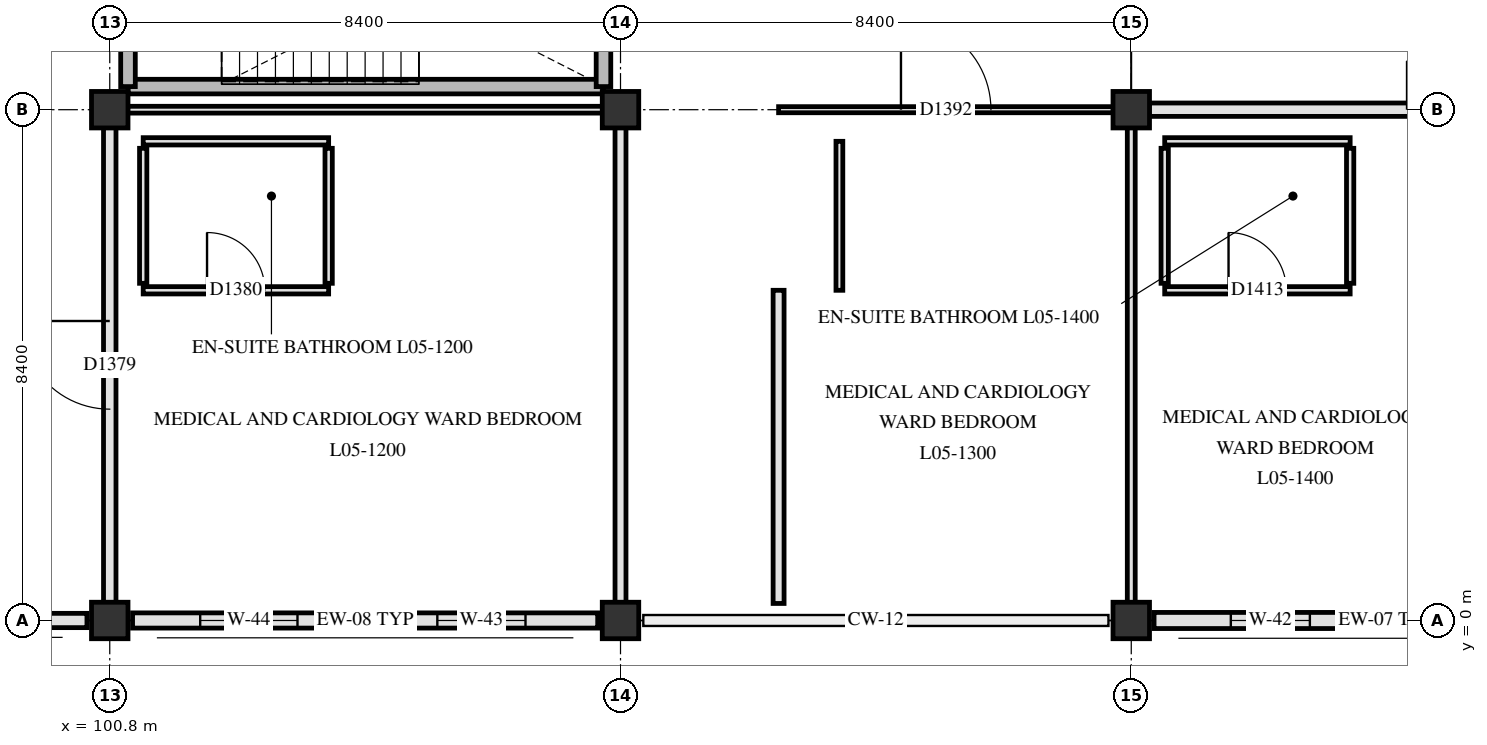
"""IFC4 building model, lengths in metres.
Left out: names, types, materials, properties, quantities, classifications, styles, units other than length and angle.
Written with IfcOpenShell. Run it as: python <this file> out.ifc"""

import sys

from ifc_helpers import new_model, si_unit, direction, frame, frame_2d, origin, origin_2d, place, context, subcontext, project, spatial, rectangle, extrude, element, fill, save


model = new_model("IFC4")
c1 = context("Model", 3, precision=1e-05, world=origin(), true_north=direction((0.0, 1.0)))
c2 = subcontext(c1, "Body", "Model", "MODEL_VIEW")
j1 = project(units=[si_unit("LENGTHUNIT", "METRE"), si_unit("PLANEANGLEUNIT", "RADIAN")], contexts=[c1])
p1 = place(None, origin())
s1 = spatial("IfcSite", under=j1, at=p1, CompositionType="ELEMENT")
p2 = place(p1, origin())
s2 = spatial("IfcBuilding", under=s1, at=p2, CompositionType="ELEMENT")
p3 = place(p2, frame((0.0, 0.0, 22.5)))
s3 = spatial("IfcBuildingStorey", under=s2, at=p3, CompositionType="ELEMENT", Elevation=22.5)
for number, where, z_axis, x_axis in (
    (1, (100.8, 0.0, 0.0), (0.0, 0.0, 1.0), (1.0, 0.0, 0.0)),
    (2, (100.8, 8.4, 0.0), (0.0, 0.0, 1.0), (1.0, 0.0, 0.0)),
    (3, (109.2, 0.0, 0.0), (0.0, 0.0, 1.0), (1.0, 0.0, 0.0)),
    (4, (109.2, 8.4, 0.0), (0.0, 0.0, 1.0), (1.0, 0.0, 0.0)),
    (5, (117.6, 0.0, 0.0), (0.0, 0.0, 1.0), (1.0, 0.0, 0.0)),
    (6, (117.6, 8.4, 0.0), (0.0, 0.0, 1.0), (1.0, 0.0, 0.0)),
):
    element("IfcColumn", number, at=place(p3, frame(where, z_axis=z_axis, x_axis=x_axis)), inside=s3, PredefinedType="COLUMN", context=c2, shape_type="SweptSolid", body=[
        extrude(rectangle(XDim=0.6, YDim=0.6, at=origin_2d()), origin(), (0.0, 0.0, 1.0), 3.9),
    ])
p4 = place(p3, frame((125.625, 0.0, 0.0), z_axis=(0.0, 0.0, 1.0), x_axis=(-1.0, 0.0, 0.0)))
e7 = element("IfcWall", 7, at=p4, inside=s3, PredefinedType="SOLIDWALL", context=c2, shape_type="SweptSolid", body=[
    extrude(rectangle(XDim=7.65, YDim=0.265, at=frame_2d((3.825, 0.0))), origin(), (0.0, 0.0, 1.0), 3.31),
])
p5 = place(p4, frame((1.337, 0.0, 0.85)))
e8 = element("IfcOpeningElement", 8, at=p5, cuts=e7, PredefinedType="OPENING", context=c2, shape_type="SweptSolid", body=[
    extrude(rectangle(XDim=1.15, YDim=1.78, at=frame_2d((0.575, 0.89))), frame((0.0, 0.142, 0.0), z_axis=(0.0, -1.0, 0.0), x_axis=(1.0, 0.0, 0.0)), (0.0, 0.0, 1.0), 0.285),
])
p6 = place(p4, frame((5.087, 0.0, 0.85)))
e9 = element("IfcOpeningElement", 9, at=p6, cuts=e7, PredefinedType="OPENING", context=c2, shape_type="SweptSolid", body=[
    extrude(rectangle(XDim=1.3, YDim=1.78, at=frame_2d((0.65, 0.89))), frame((0.0, 0.142, 0.0), z_axis=(0.0, -1.0, 0.0), x_axis=(1.0, 0.0, 0.0)), (0.0, 0.0, 1.0), 0.285),
])
p7 = place(p3, frame((108.825, 0.0, 0.0), z_axis=(0.0, 0.0, 1.0), x_axis=(-1.0, 0.0, 0.0)))
e10 = element("IfcWall", 10, at=p7, inside=s3, PredefinedType="SOLIDWALL", context=c2, shape_type="SweptSolid", body=[
    extrude(rectangle(XDim=7.65, YDim=0.25, at=frame_2d((3.825, 0.0))), origin(), (0.0, 0.0, 1.0), 3.31),
])
p8 = place(p7, frame((1.188, 0.0, 0.85)))
e11 = element("IfcOpeningElement", 11, at=p8, cuts=e10, PredefinedType="OPENING", context=c2, shape_type="SweptSolid", body=[
    extrude(rectangle(XDim=1.45, YDim=1.78, at=frame_2d((0.725, 0.89))), frame((0.0, 0.135, 0.0), z_axis=(0.0, -1.0, 0.0), x_axis=(1.0, 0.0, 0.0)), (0.0, 0.0, 1.0), 0.27),
])
p9 = place(p7, frame((4.938, 0.0, 0.85)))
e12 = element("IfcOpeningElement", 12, at=p9, cuts=e10, PredefinedType="OPENING", context=c2, shape_type="SweptSolid", body=[
    extrude(rectangle(XDim=1.6, YDim=1.78, at=frame_2d((0.8, 0.89))), frame((0.0, 0.135, 0.0), z_axis=(0.0, -1.0, 0.0), x_axis=(1.0, 0.0, 0.0)), (0.0, 0.0, 1.0), 0.27),
])
p10 = place(p3, frame((100.425, 0.0, 0.0), z_axis=(0.0, 0.0, 1.0), x_axis=(-1.0, 0.0, 0.0)))
e13 = element("IfcWall", 13, at=p10, inside=s3, PredefinedType="SOLIDWALL", context=c2, shape_type="SweptSolid", body=[
    extrude(rectangle(XDim=7.65, YDim=0.235, at=frame_2d((3.825, 0.0))), origin(), (0.0, 0.0, 1.0), 3.31),
])
p11 = place(p10, frame((1.038, 0.0, 0.85)))
e14 = element("IfcOpeningElement", 14, at=p11, cuts=e13, PredefinedType="OPENING", context=c2, shape_type="SweptSolid", body=[
    extrude(rectangle(XDim=1.75, YDim=1.78, at=frame_2d((0.875, 0.89))), frame((0.0, 0.127, 0.0), z_axis=(0.0, -1.0, 0.0), x_axis=(1.0, 0.0, 0.0)), (0.0, 0.0, 1.0), 0.255),
])
p12 = place(p10, frame((4.788, 0.0, 0.85)))
e15 = element("IfcOpeningElement", 15, at=p12, cuts=e13, PredefinedType="OPENING", context=c2, shape_type="SweptSolid", body=[
    extrude(rectangle(XDim=1.9, YDim=1.78, at=frame_2d((0.95, 0.89))), frame((0.0, 0.127, 0.0), z_axis=(0.0, -1.0, 0.0), x_axis=(1.0, 0.0, 0.0)), (0.0, 0.0, 1.0), 0.255),
])
p13 = place(p3, frame((101.1, 8.78, 0.0), z_axis=(0.0, 0.0, 1.0), x_axis=(1.0, 0.0, 0.0)))
e16 = element("IfcWall", 16, at=p13, inside=s3, PredefinedType="SHEAR", context=c2, shape_type="SweptSolid", body=[
    extrude(rectangle(XDim=7.82, YDim=0.24, at=frame_2d((3.91, 0.0))), origin(), (0.0, 0.0, 1.0), 3.62),
])
for number, where, z_axis, x_axis in (
    (17, (101.1, 8.78, 0.0), (0.0, 0.0, 1.0), (0.0, 1.0, 0.0)),
    (18, (108.92, 8.78, 0.0), (0.0, 0.0, 1.0), (0.0, 1.0, 0.0)),
):
    element("IfcWall", number, at=place(p3, frame(where, z_axis=z_axis, x_axis=x_axis)), inside=s3, PredefinedType="SHEAR", context=c2, shape_type="SweptSolid", body=[
        extrude(rectangle(XDim=3.32, YDim=0.24, at=frame_2d((1.66, 0.0))), origin(), (0.0, 0.0, 1.0), 3.62),
    ])
p14 = place(p3, frame((101.35, 5.43, 0.0), z_axis=(0.0, 0.0, 1.0), x_axis=(1.0, 0.0, 0.0)))
e19 = element("IfcWall", 19, at=p14, inside=s3, PredefinedType="PARTITIONING", context=c2, shape_type="SweptSolid", body=[
    extrude(rectangle(XDim=3.05, YDim=0.12, at=frame_2d((1.525, 0.0))), origin(), (0.0, 0.0, 1.0), 3.61),
])
p15 = place(p14, frame((1.05, 0.0, 0.0)))
e20 = element("IfcOpeningElement", 20, at=p15, cuts=e19, PredefinedType="OPENING", context=c2, shape_type="SweptSolid", body=[
    extrude(rectangle(XDim=0.95, YDim=2.1, at=frame_2d((0.475, 1.05))), frame((0.0, 0.07, 0.0), z_axis=(0.0, -1.0, 0.0), x_axis=(1.0, 0.0, 0.0)), (0.0, 0.0, 1.0), 0.14),
])
p16 = place(p3, frame((118.15, 5.43, 0.0), z_axis=(0.0, 0.0, 1.0), x_axis=(1.0, 0.0, 0.0)))
e21 = element("IfcWall", 21, at=p16, inside=s3, PredefinedType="PARTITIONING", context=c2, shape_type="SweptSolid", body=[
    extrude(rectangle(XDim=3.05, YDim=0.12, at=frame_2d((1.525, 0.0))), origin(), (0.0, 0.0, 1.0), 3.61),
])
p17 = place(p16, frame((1.05, 0.0, 0.0)))
e22 = element("IfcOpeningElement", 22, at=p17, cuts=e21, PredefinedType="OPENING", context=c2, shape_type="SweptSolid", body=[
    extrude(rectangle(XDim=0.95, YDim=2.1, at=frame_2d((0.475, 1.05))), frame((0.0, 0.07, 0.0), z_axis=(0.0, -1.0, 0.0), x_axis=(1.0, 0.0, 0.0)), (0.0, 0.0, 1.0), 0.14),
])
p18 = place(p3, frame((101.35, 7.88, 0.0), z_axis=(0.0, 0.0, 1.0), x_axis=(1.0, 0.0, 0.0)))
e23 = element("IfcWall", 23, at=p18, inside=s3, PredefinedType="PARTITIONING", context=c2, shape_type="SweptSolid", body=[
    extrude(rectangle(XDim=3.05, YDim=0.12, at=frame_2d((1.525, 0.0))), origin(), (0.0, 0.0, 1.0), 3.61),
])
p19 = place(p3, frame((118.15, 7.88, 0.0), z_axis=(0.0, 0.0, 1.0), x_axis=(1.0, 0.0, 0.0)))
e24 = element("IfcWall", 24, at=p19, inside=s3, PredefinedType="PARTITIONING", context=c2, shape_type="SweptSolid", body=[
    extrude(rectangle(XDim=3.05, YDim=0.12, at=frame_2d((1.525, 0.0))), origin(), (0.0, 0.0, 1.0), 3.61),
])
p20 = place(p3, frame((101.095, 8.4, 0.0), z_axis=(0.0, 0.0, 1.0), x_axis=(1.0, 0.0, 0.0)))
e25 = element("IfcWall", 25, at=p20, inside=s3, PredefinedType="PARTITIONING", context=c2, shape_type="SweptSolid", body=[
    extrude(rectangle(XDim=7.81, YDim=0.112, at=frame_2d((3.905, 0.0))), origin(), (0.0, 0.0, 1.0), 3.16),
])
p21 = place(p3, frame((111.8, 8.4, 0.0), z_axis=(0.0, 0.0, 1.0), x_axis=(1.0, 0.0, 0.0)))
e26 = element("IfcWall", 26, at=p21, inside=s3, PredefinedType="PARTITIONING", context=c2, shape_type="SweptSolid", body=[
    extrude(rectangle(XDim=5.505, YDim=0.1, at=frame_2d((2.752, 0.0))), origin(), (0.0, 0.0, 1.0), 3.16),
])
p22 = place(p21, frame((2.012, 0.0, 0.0)))
e27 = element("IfcOpeningElement", 27, at=p22, cuts=e26, PredefinedType="OPENING", context=c2, shape_type="SweptSolid", body=[
    extrude(rectangle(XDim=1.48, YDim=2.22, at=frame_2d((0.74, 1.11))), frame((0.0, 0.06, 0.0), z_axis=(0.0, -1.0, 0.0), x_axis=(1.0, 0.0, 0.0)), (0.0, 0.0, 1.0), 0.12),
])
p23 = place(p3, frame((117.895, 8.4, 0.0), z_axis=(0.0, 0.0, 1.0), x_axis=(1.0, 0.0, 0.0)))
e28 = element("IfcWall", 28, at=p23, inside=s3, PredefinedType="PARTITIONING", context=c2, shape_type="SweptSolid", body=[
    extrude(rectangle(XDim=7.81, YDim=0.22, at=frame_2d((3.905, 0.0))), origin(), (0.0, 0.0, 1.0), 3.16),
])
p24 = place(p23, frame((4.24, 0.0, 0.0)))
e29 = element("IfcOpeningElement", 29, at=p24, cuts=e28, PredefinedType="OPENING", context=c2, shape_type="SweptSolid", body=[
    extrude(rectangle(XDim=1.6, YDim=2.25, at=frame_2d((0.8, 1.125))), frame((0.0, 0.12, 0.0), z_axis=(0.0, -1.0, 0.0), x_axis=(1.0, 0.0, 0.0)), (0.0, 0.0, 1.0), 0.24),
])
p25 = place(p3, frame((100.8, 0.295, 0.0), z_axis=(0.0, 0.0, 1.0), x_axis=(0.0, 1.0, 0.0)))
e30 = element("IfcWall", 30, at=p25, inside=s3, PredefinedType="PARTITIONING", context=c2, shape_type="SweptSolid", body=[
    extrude(rectangle(XDim=7.81, YDim=0.205, at=frame_2d((3.905, 0.0))), origin(), (0.0, 0.0, 1.0), 3.3),
])
p26 = place(p25, frame((3.18, 0.0, 0.0)))
e31 = element("IfcOpeningElement", 31, at=p26, cuts=e30, PredefinedType="OPENING", context=c2, shape_type="SweptSolid", body=[
    extrude(rectangle(XDim=1.45, YDim=2.2, at=frame_2d((0.725, 1.1))), frame((0.0, 0.113, 0.0), z_axis=(0.0, -1.0, 0.0), x_axis=(1.0, 0.0, 0.0)), (0.0, 0.0, 1.0), 0.225),
])
for number, where, z_axis, x_axis in (
    (32, (101.35, 5.545, 0.0), (0.0, 0.0, 1.0), (0.0, 1.0, 0.0)),
    (33, (104.4, 5.545, 0.0), (0.0, 0.0, 1.0), (0.0, 1.0, 0.0)),
):
    element("IfcWall", number, at=place(p3, frame(where, z_axis=z_axis, x_axis=x_axis)), inside=s3, PredefinedType="PARTITIONING", context=c2, shape_type="SweptSolid", body=[
        extrude(rectangle(XDim=2.22, YDim=0.12, at=frame_2d((1.11, 0.0))), origin(), (0.0, 0.0, 1.0), 3.34),
    ])
p27 = place(p3, frame((109.2, 0.295, 0.0), z_axis=(0.0, 0.0, 1.0), x_axis=(0.0, 1.0, 0.0)))
e34 = element("IfcWall", 34, at=p27, inside=s3, PredefinedType="PARTITIONING", context=c2, shape_type="SweptSolid", body=[
    extrude(rectangle(XDim=7.81, YDim=0.18, at=frame_2d((3.905, 0.0))), origin(), (0.0, 0.0, 1.0), 3.3),
])
p28 = place(p3, frame((111.8, 0.28, 0.0), z_axis=(0.0, 0.0, 1.0), x_axis=(0.0, 1.0, 0.0)))
e35 = element("IfcWall", 35, at=p28, inside=s3, PredefinedType="PARTITIONING", context=c2, shape_type="SweptSolid", body=[
    extrude(rectangle(XDim=5.15, YDim=0.18, at=frame_2d((2.575, 0.0))), origin(), (0.0, 0.0, 1.0), 3.34),
])
p29 = place(p3, frame((112.8, 5.43, 0.0), z_axis=(0.0, 0.0, 1.0), x_axis=(0.0, 1.0, 0.0)))
e36 = element("IfcWall", 36, at=p29, inside=s3, PredefinedType="PARTITIONING", context=c2, shape_type="SweptSolid", body=[
    extrude(rectangle(XDim=2.45, YDim=0.112, at=frame_2d((1.225, 0.0))), origin(), (0.0, 0.0, 1.0), 3.34),
])
p30 = place(p3, frame((117.6, 0.295, 0.0), z_axis=(0.0, 0.0, 1.0), x_axis=(0.0, 1.0, 0.0)))
e37 = element("IfcWall", 37, at=p30, inside=s3, PredefinedType="PARTITIONING", context=c2, shape_type="SweptSolid", body=[
    extrude(rectangle(XDim=7.81, YDim=0.13, at=frame_2d((3.905, 0.0))), origin(), (0.0, 0.0, 1.0), 3.3),
])
for number, where, z_axis, x_axis in (
    (38, (118.15, 5.545, 0.0), (0.0, 0.0, 1.0), (0.0, 1.0, 0.0)),
    (39, (121.2, 5.545, 0.0), (0.0, 0.0, 1.0), (0.0, 1.0, 0.0)),
):
    element("IfcWall", number, at=place(p3, frame(where, z_axis=z_axis, x_axis=x_axis)), inside=s3, PredefinedType="PARTITIONING", context=c2, shape_type="SweptSolid", body=[
        extrude(rectangle(XDim=2.22, YDim=0.12, at=frame_2d((1.11, 0.0))), origin(), (0.0, 0.0, 1.0), 3.34),
    ])
p31 = place(p6, origin())
e40 = element("IfcWindow", 40, at=p31, inside=s3, PartitioningType="SINGLE_PANEL", PredefinedType="WINDOW", context=c2, shape_type="SweptSolid", body=[
    extrude(rectangle(XDim=1.3, YDim=1.78, at=frame_2d((0.65, 0.89))), frame((0.0, 0.03, 0.0), z_axis=(0.0, -1.0, 0.0), x_axis=(1.0, 0.0, 0.0)), (0.0, 0.0, 1.0), 0.06),
])
fill(e9, e40)
p32 = place(p8, origin())
e41 = element("IfcWindow", 41, at=p32, inside=s3, PartitioningType="SINGLE_PANEL", PredefinedType="WINDOW", context=c2, shape_type="SweptSolid", body=[
    extrude(rectangle(XDim=1.45, YDim=1.78, at=frame_2d((0.725, 0.89))), frame((0.0, 0.03, 0.0), z_axis=(0.0, -1.0, 0.0), x_axis=(1.0, 0.0, 0.0)), (0.0, 0.0, 1.0), 0.06),
])
fill(e11, e41)
p33 = place(p9, origin())
e42 = element("IfcWindow", 42, at=p33, inside=s3, PartitioningType="SINGLE_PANEL", PredefinedType="WINDOW", context=c2, shape_type="SweptSolid", body=[
    extrude(rectangle(XDim=1.6, YDim=1.78, at=frame_2d((0.8, 0.89))), frame((0.0, 0.03, 0.0), z_axis=(0.0, -1.0, 0.0), x_axis=(1.0, 0.0, 0.0)), (0.0, 0.0, 1.0), 0.06),
])
fill(e12, e42)
p34 = place(p26, origin())
e43 = element("IfcDoor", 43, at=p34, inside=s3, OperationType="SINGLE_SWING_RIGHT", PredefinedType="DOOR", context=c2, shape_type="SweptSolid", body=[
    extrude(rectangle(XDim=1.45, YDim=2.2, at=frame_2d((0.725, 1.1))), frame((0.0, 0.025, 0.0), z_axis=(0.0, -1.0, 0.0), x_axis=(1.0, 0.0, 0.0)), (0.0, 0.0, 1.0), 0.05),
])
fill(e31, e43)
p35 = place(p15, origin())
e44 = element("IfcDoor", 44, at=p35, inside=s3, OperationType="SINGLE_SWING_LEFT", PredefinedType="DOOR", context=c2, shape_type="SweptSolid", body=[
    extrude(rectangle(XDim=0.95, YDim=2.1, at=frame_2d((0.475, 1.05))), frame((0.0, 0.025, 0.0), z_axis=(0.0, -1.0, 0.0), x_axis=(1.0, 0.0, 0.0)), (0.0, 0.0, 1.0), 0.05),
])
fill(e20, e44)
p36 = place(p22, origin())
e45 = element("IfcDoor", 45, at=p36, inside=s3, OperationType="SINGLE_SWING_LEFT", PredefinedType="DOOR", context=c2, shape_type="SweptSolid", body=[
    extrude(rectangle(XDim=1.48, YDim=2.22, at=frame_2d((0.74, 1.11))), frame((0.0, 0.025, 0.0), z_axis=(0.0, -1.0, 0.0), x_axis=(1.0, 0.0, 0.0)), (0.0, 0.0, 1.0), 0.05),
])
fill(e27, e45)
p37 = place(p24, origin())
e46 = element("IfcDoor", 46, at=p37, inside=s3, OperationType="DOUBLE_SWING_LEFT", PredefinedType="DOOR", context=c2, shape_type="SweptSolid", body=[
    extrude(rectangle(XDim=1.6, YDim=2.25, at=frame_2d((0.8, 1.125))), frame((0.0, 0.025, 0.0), z_axis=(0.0, -1.0, 0.0), x_axis=(1.0, 0.0, 0.0)), (0.0, 0.0, 1.0), 0.05),
])
fill(e29, e46)
p38 = place(p17, origin())
e47 = element("IfcDoor", 47, at=p38, inside=s3, OperationType="SINGLE_SWING_LEFT", PredefinedType="DOOR", context=c2, shape_type="SweptSolid", body=[
    extrude(rectangle(XDim=0.95, YDim=2.1, at=frame_2d((0.475, 1.05))), frame((0.0, 0.025, 0.0), z_axis=(0.0, -1.0, 0.0), x_axis=(1.0, 0.0, 0.0)), (0.0, 0.0, 1.0), 0.05),
])
fill(e22, e47)
save(model, sys.argv[1])
